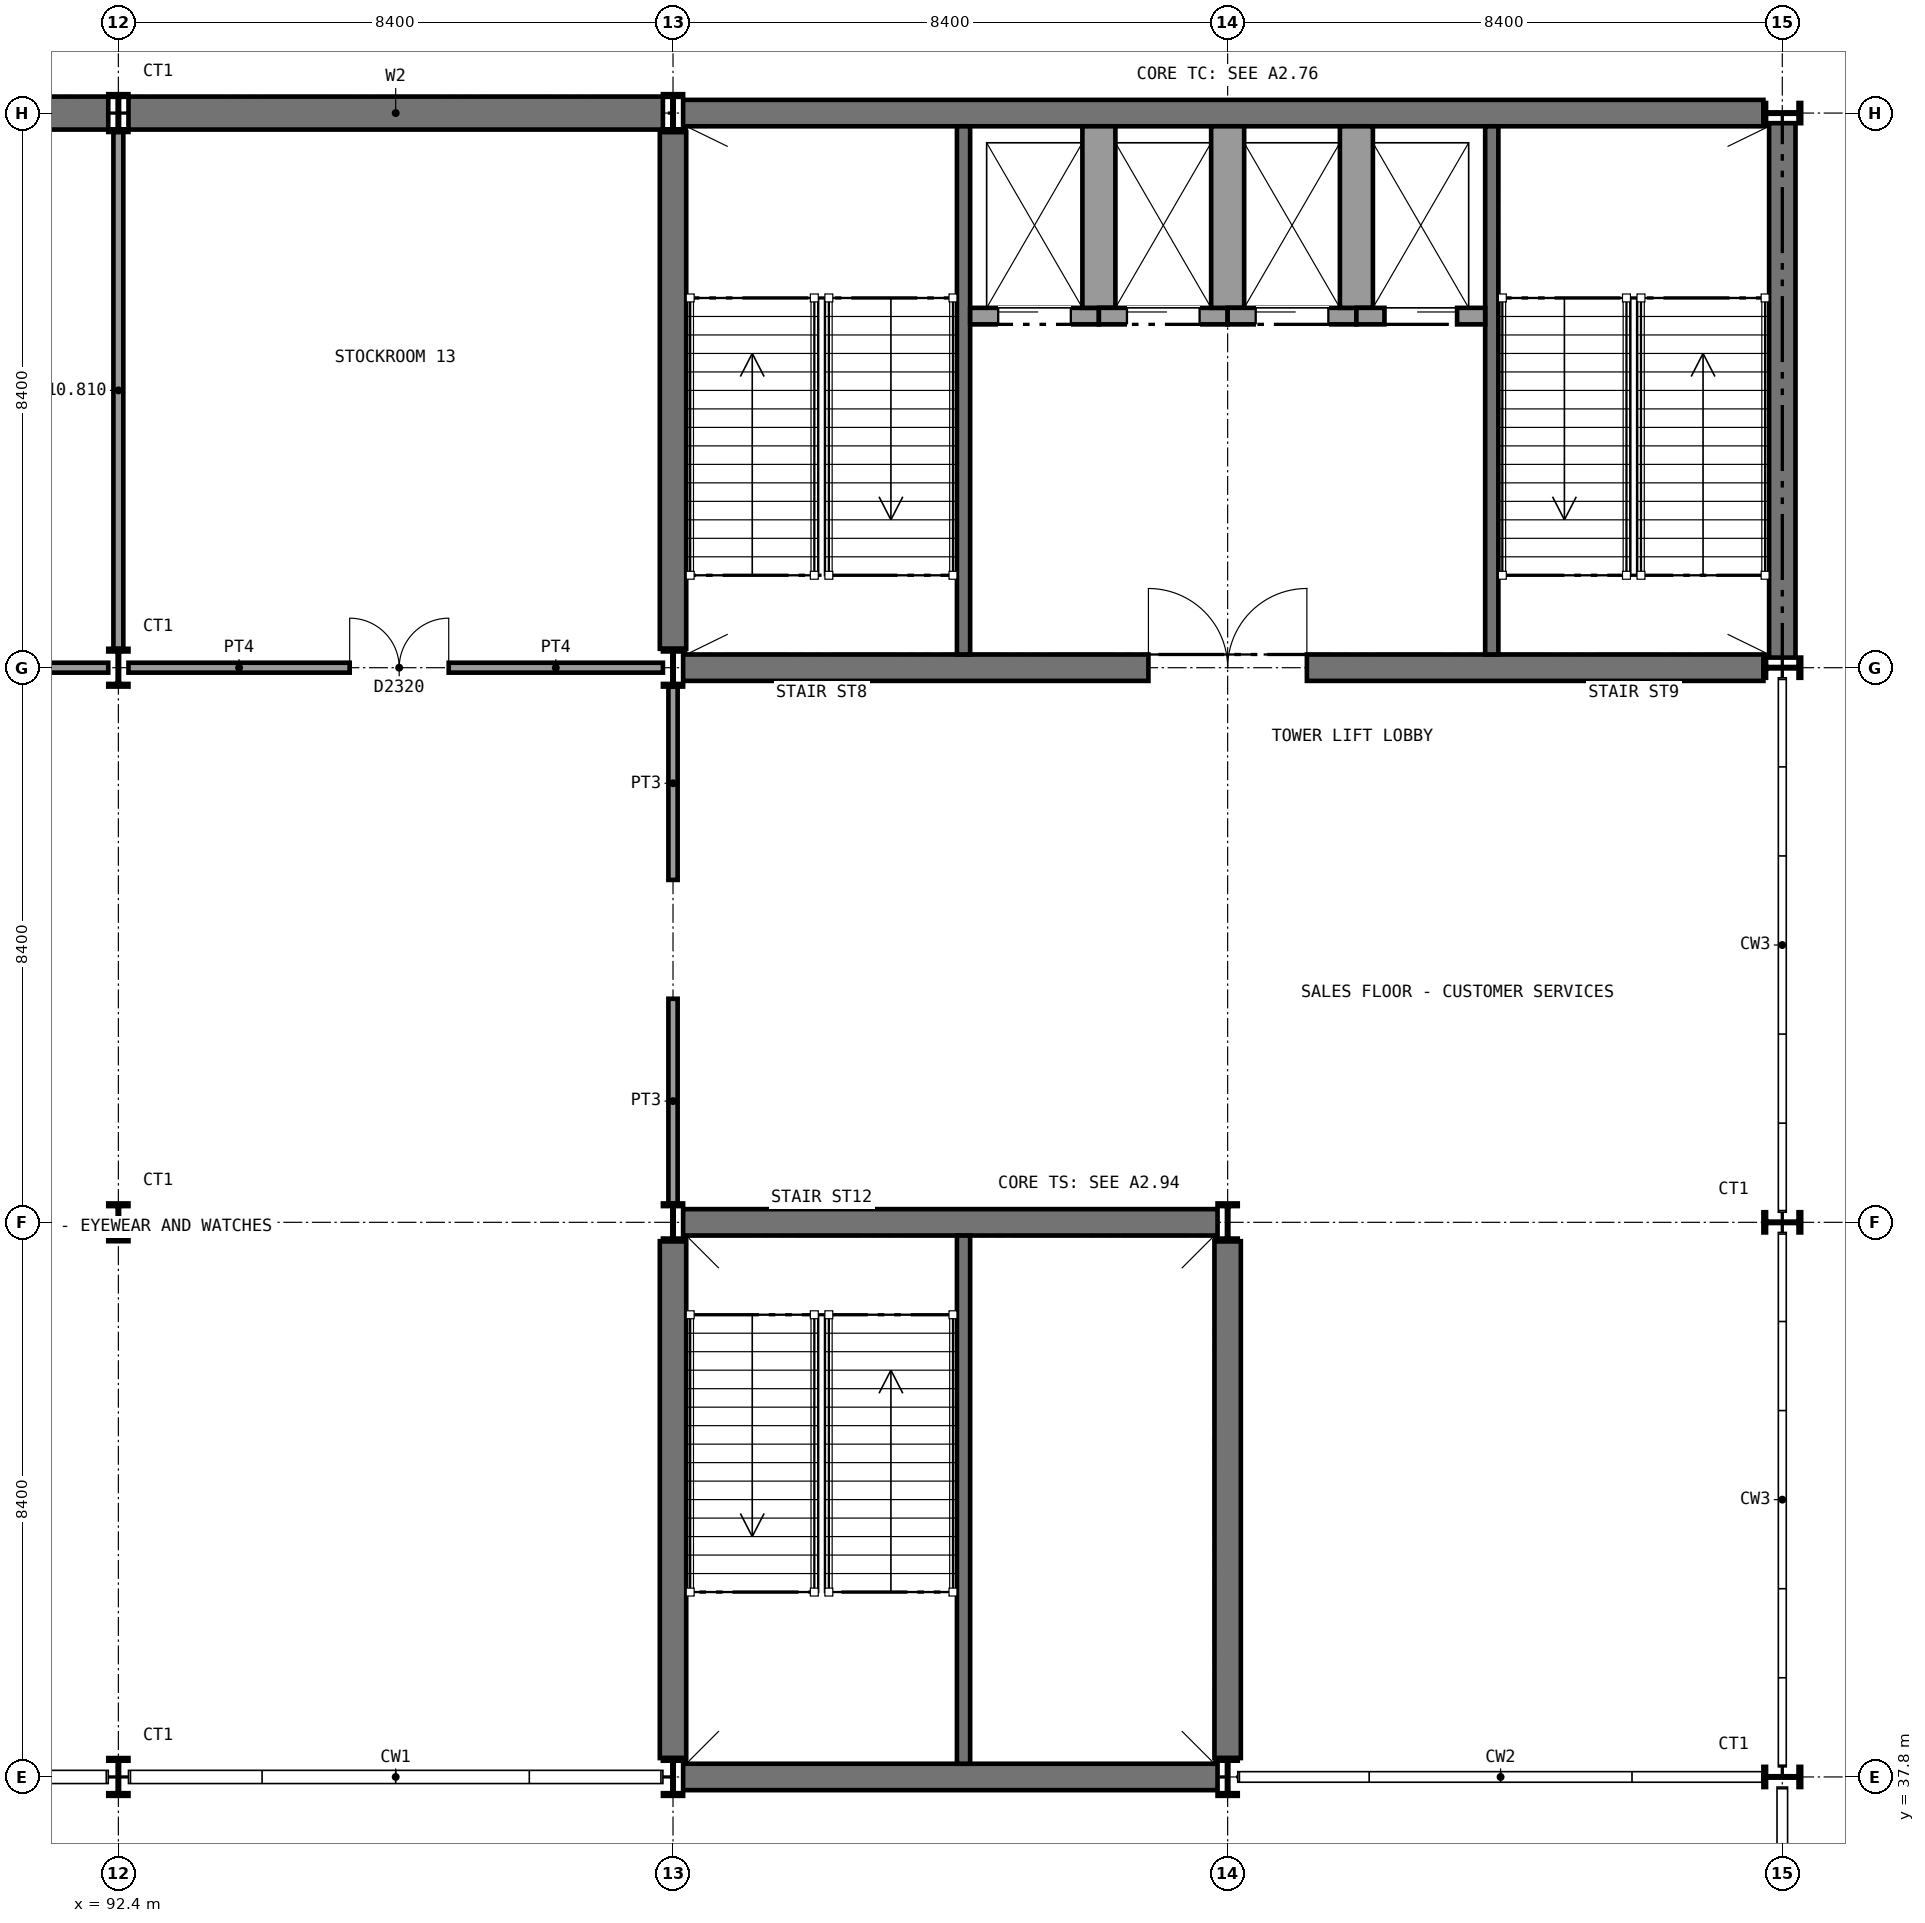
"""IFC4 building model, lengths in metres.
Left out: names, types, materials, properties, quantities, classifications, styles, units other than length and angle.
Written with IfcOpenShell. Run it as: python <this file> out.ifc"""

import sys

from ifc_helpers import new_model, si_unit, direction, frame, frame_2d, origin, origin_2d, place, context, subcontext, project, spatial, rectangle, i_section, extrude, element, fill, save


model = new_model("IFC4")
c1 = context("Model", 3, precision=1e-05, world=origin(), true_north=direction((0.0, 1.0)))
c2 = subcontext(c1, "Body", "Model", "MODEL_VIEW")
j1 = project(units=[si_unit("LENGTHUNIT", "METRE"), si_unit("PLANEANGLEUNIT", "RADIAN")], contexts=[c1])
p1 = place(None, origin())
s1 = spatial("IfcSite", under=j1, at=p1, CompositionType="ELEMENT")
p2 = place(p1, origin())
s2 = spatial("IfcBuilding", under=s1, at=p2, CompositionType="ELEMENT")
p3 = place(p2, frame((0.0, 0.0, 6.0)))
s3 = spatial("IfcBuildingStorey", under=s2, at=p3, CompositionType="ELEMENT", Elevation=6.0)
p4 = place(p3, frame((84.153, 63.0, 0.0), z_axis=(0.0, 0.0, 1.0), x_axis=(1.0, 0.0, 0.0)))
e1 = element("IfcWall", 1, at=p4, inside=s3, PredefinedType="SHEAR", context=c2, shape_type="SweptSolid", body=[
    extrude(rectangle(XDim=8.094, YDim=0.5, at=frame_2d((4.047, 0.0))), origin(), (0.0, 0.0, 1.0), 5.25),
])
p5 = place(p3, frame((92.553, 63.0, 0.0), z_axis=(0.0, 0.0, 1.0), x_axis=(1.0, 0.0, 0.0)))
e2 = element("IfcWall", 2, at=p5, inside=s3, PredefinedType="SHEAR", context=c2, shape_type="SweptSolid", body=[
    extrude(rectangle(XDim=8.094, YDim=0.5, at=frame_2d((4.047, 0.0))), origin(), (0.0, 0.0, 1.0), 5.25),
])
p6 = place(p3, frame((100.953, 63.0, 0.0), z_axis=(0.0, 0.0, 1.0), x_axis=(1.0, 0.0, 0.0)))
e3 = element("IfcWall", 3, at=p6, inside=s3, PredefinedType="SHEAR", context=c2, shape_type="SweptSolid", body=[
    extrude(rectangle(XDim=16.361, YDim=0.4, at=frame_2d((8.181, 0.0))), origin(), (0.0, 0.0, 1.0), 5.25),
])
p7 = place(p3, frame((100.953, 54.6, 0.0), z_axis=(0.0, 0.0, 1.0), x_axis=(1.0, 0.0, 0.0)))
e4 = element("IfcWall", 4, at=p7, inside=s3, PredefinedType="SHEAR", context=c2, shape_type="SweptSolid", body=[
    extrude(rectangle(XDim=16.361, YDim=0.4, at=frame_2d((8.181, 0.0))), origin(), (0.0, 0.0, 1.0), 5.25),
])
p8 = place(p7, frame((7.047, 0.0, 0.0)))
e5 = element("IfcOpeningElement", 5, at=p8, cuts=e4, PredefinedType="OPENING", context=c2, shape_type="SweptSolid", body=[
    extrude(rectangle(XDim=2.4, YDim=2.4, at=frame_2d((1.2, 1.2))), frame((0.0, 0.21, 0.0), z_axis=(0.0, -1.0, 0.0), x_axis=(1.0, 0.0, 0.0)), (0.0, 0.0, 1.0), 0.42),
])
p9 = place(p3, frame((100.8, 54.886, 0.0), z_axis=(0.0, 0.0, 1.0), x_axis=(0.0, 1.0, 0.0)))
e6 = element("IfcWall", 6, at=p9, inside=s3, PredefinedType="SHEAR", context=c2, shape_type="SweptSolid", body=[
    extrude(rectangle(XDim=7.828, YDim=0.4, at=frame_2d((3.914, 0.0))), origin(), (0.0, 0.0, 1.0), 5.25),
])
for number, where, z_axis, x_axis in (
    (7, (117.6, 54.753, 0.0), (0.0, 0.0, 1.0), (0.0, 1.0, 0.0)),
    (8, (100.953, 37.8, 0.0), (0.0, 0.0, 1.0), (1.0, 0.0, 0.0)),
    (9, (100.953, 46.2, 0.0), (0.0, 0.0, 1.0), (1.0, 0.0, 0.0)),
):
    element("IfcWall", number, at=place(p3, frame(where, z_axis=z_axis, x_axis=x_axis)), inside=s3, PredefinedType="SHEAR", context=c2, shape_type="SweptSolid", body=[
        extrude(rectangle(XDim=8.094, YDim=0.4, at=frame_2d((4.047, 0.0))), origin(), (0.0, 0.0, 1.0), 5.25),
    ])
for number, where, z_axis, x_axis in (
    (10, (100.8, 38.086, 0.0), (0.0, 0.0, 1.0), (0.0, 1.0, 0.0)),
    (11, (109.2, 38.086, 0.0), (0.0, 0.0, 1.0), (0.0, 1.0, 0.0)),
):
    element("IfcWall", number, at=place(p3, frame(where, z_axis=z_axis, x_axis=x_axis)), inside=s3, PredefinedType="SHEAR", context=c2, shape_type="SweptSolid", body=[
        extrude(rectangle(XDim=7.828, YDim=0.4, at=frame_2d((3.914, 0.0))), origin(), (0.0, 0.0, 1.0), 5.25),
    ])
for number, where, z_axis, x_axis in (
    (12, (92.4, 37.8, 0.0), (0.0, 0.0, 1.0), (1.0, 0.0, 0.0)),
    (13, (92.4, 46.2, 0.0), (0.0, 0.0, 1.0), (1.0, 0.0, 0.0)),
    (14, (92.4, 54.6, 0.0), (0.0, 0.0, 1.0), (1.0, 0.0, 0.0)),
    (15, (92.4, 63.0, 0.0), (0.0, 0.0, 1.0), (1.0, 0.0, 0.0)),
    (16, (100.8, 37.8, 0.0), (0.0, 0.0, 1.0), (1.0, 0.0, 0.0)),
    (17, (100.8, 46.2, 0.0), (0.0, 0.0, 1.0), (1.0, 0.0, 0.0)),
    (18, (100.8, 54.6, 0.0), (0.0, 0.0, 1.0), (1.0, 0.0, 0.0)),
    (19, (100.8, 63.0, 0.0), (0.0, 0.0, 1.0), (1.0, 0.0, 0.0)),
    (20, (109.2, 37.8, 0.0), (0.0, 0.0, 1.0), (1.0, 0.0, 0.0)),
    (21, (109.2, 46.2, 0.0), (0.0, 0.0, 1.0), (1.0, 0.0, 0.0)),
    (22, (117.6, 37.8, 0.0), (0.0, 0.0, 1.0), (0.0, 1.0, 0.0)),
    (23, (117.6, 46.2, 0.0), (0.0, 0.0, 1.0), (0.0, 1.0, 0.0)),
    (24, (117.6, 54.6, 0.0), (0.0, 0.0, 1.0), (0.0, 1.0, 0.0)),
    (25, (117.6, 63.0, 0.0), (0.0, 0.0, 1.0), (0.0, 1.0, 0.0)),
):
    element("IfcColumn", number, at=place(p3, frame(where, z_axis=z_axis, x_axis=x_axis)), inside=s3, PredefinedType="COLUMN", context=c2, shape_type="SweptSolid", body=[
        extrude(i_section(OverallWidth=0.306, OverallDepth=0.572, WebThickness=0.021, FlangeThickness=0.04, FilletRadius=0.027, at=origin_2d()), origin(), (0.0, 0.0, 1.0), 5.4),
    ])
p10 = place(p3, frame((92.4, 54.886, 0.0), z_axis=(0.0, 0.0, 1.0), x_axis=(0.0, 1.0, 0.0)))
e26 = element("IfcWall", 26, at=p10, inside=s3, PredefinedType="SOLIDWALL", context=c2, shape_type="SweptSolid", body=[
    extrude(rectangle(XDim=7.828, YDim=0.15, at=frame_2d((3.914, 0.0))), origin(), (0.0, 0.0, 1.0), 4.81),
])
p11 = place(p3, frame((84.153, 54.6, 0.0), z_axis=(0.0, 0.0, 1.0), x_axis=(1.0, 0.0, 0.0)))
e27 = element("IfcWall", 27, at=p11, inside=s3, PredefinedType="SOLIDWALL", context=c2, shape_type="SweptSolid", body=[
    extrude(rectangle(XDim=8.094, YDim=0.15, at=frame_2d((4.047, 0.0))), origin(), (0.0, 0.0, 1.0), 4.92),
])
p12 = place(p11, frame((3.35, 0.0, 0.0)))
e28 = element("IfcOpeningElement", 28, at=p12, cuts=e27, PredefinedType="OPENING", context=c2, shape_type="SweptSolid", body=[
    extrude(rectangle(XDim=1.5, YDim=2.1, at=frame_2d((0.75, 1.05))), frame((0.0, 0.085, 0.0), z_axis=(0.0, -1.0, 0.0), x_axis=(1.0, 0.0, 0.0)), (0.0, 0.0, 1.0), 0.17),
])
p13 = place(p3, frame((92.553, 54.6, 0.0), z_axis=(0.0, 0.0, 1.0), x_axis=(1.0, 0.0, 0.0)))
e29 = element("IfcWall", 29, at=p13, inside=s3, PredefinedType="SOLIDWALL", context=c2, shape_type="SweptSolid", body=[
    extrude(rectangle(XDim=8.094, YDim=0.15, at=frame_2d((4.047, 0.0))), origin(), (0.0, 0.0, 1.0), 4.92),
])
p14 = place(p13, frame((3.35, 0.0, 0.0)))
e30 = element("IfcOpeningElement", 30, at=p14, cuts=e29, PredefinedType="OPENING", context=c2, shape_type="SweptSolid", body=[
    extrude(rectangle(XDim=1.5, YDim=2.1, at=frame_2d((0.75, 1.05))), frame((0.0, 0.085, 0.0), z_axis=(0.0, -1.0, 0.0), x_axis=(1.0, 0.0, 0.0)), (0.0, 0.0, 1.0), 0.17),
])
p15 = place(p3, frame((100.8, 46.486, 0.0), z_axis=(0.0, 0.0, 1.0), x_axis=(0.0, 1.0, 0.0)))
e31 = element("IfcWall", 31, at=p15, inside=s3, PredefinedType="PARTITIONING", context=c2, shape_type="SweptSolid", body=[
    extrude(rectangle(XDim=3.1, YDim=0.14, at=frame_2d((1.55, 0.0))), origin(), (0.0, 0.0, 1.0), 4.81),
])
p16 = place(p3, frame((100.8, 51.386, 0.0), z_axis=(0.0, 0.0, 1.0), x_axis=(0.0, 1.0, 0.0)))
e32 = element("IfcWall", 32, at=p16, inside=s3, PredefinedType="PARTITIONING", context=c2, shape_type="SweptSolid", body=[
    extrude(rectangle(XDim=2.928, YDim=0.14, at=frame_2d((1.464, 0.0))), origin(), (0.0, 0.0, 1.0), 4.81),
])
for number, where, z_axis, x_axis in (
    (33, (105.2, 62.8, 0.0), (0.0, 0.0, 1.0), (0.0, -1.0, 0.0)),
    (34, (113.2, 62.8, 0.0), (0.0, 0.0, 1.0), (0.0, -1.0, 0.0)),
):
    element("IfcWall", number, at=place(p3, frame(where, z_axis=z_axis, x_axis=x_axis)), inside=s3, PredefinedType="SHEAR", context=c2, shape_type="SweptSolid", body=[
        extrude(rectangle(XDim=8.0, YDim=0.2, at=frame_2d((4.0, 0.0))), origin(), (0.0, 0.0, 1.0), 5.25),
    ])
p17 = place(p3, frame((105.3, 59.925, 0.0), z_axis=(0.0, 0.0, 1.0), x_axis=(1.0, 0.0, 0.0)))
e35 = element("IfcWall", 35, at=p17, inside=s3, PredefinedType="SOLIDWALL", context=c2, shape_type="SweptSolid", body=[
    extrude(rectangle(XDim=1.95, YDim=0.25, at=frame_2d((0.975, 0.0))), origin(), (0.0, 0.0, 1.0), 5.4),
])
p18 = place(p17, frame((0.425, 0.0, 0.0)))
e36 = element("IfcOpeningElement", 36, at=p18, cuts=e35, PredefinedType="OPENING", context=c2, shape_type="SweptSolid", body=[
    extrude(rectangle(XDim=1.1, YDim=2.1, at=frame_2d((0.55, 1.05))), frame((0.0, 0.135, 0.0), z_axis=(0.0, -1.0, 0.0), x_axis=(1.0, 0.0, 0.0)), (0.0, 0.0, 1.0), 0.27),
])
p19 = place(p3, frame((107.25, 62.8, 0.0), z_axis=(0.0, 0.0, 1.0), x_axis=(0.0, -1.0, 0.0)))
e37 = element("IfcWall", 37, at=p19, inside=s3, PredefinedType="SOLIDWALL", context=c2, shape_type="SweptSolid", body=[
    extrude(rectangle(XDim=2.75, YDim=0.5, at=frame_2d((1.375, 0.0))), origin(), (0.0, 0.0, 1.0), 5.4),
])
p20 = place(p3, frame((107.25, 59.925, 0.0), z_axis=(0.0, 0.0, 1.0), x_axis=(1.0, 0.0, 0.0)))
e38 = element("IfcWall", 38, at=p20, inside=s3, PredefinedType="SOLIDWALL", context=c2, shape_type="SweptSolid", body=[
    extrude(rectangle(XDim=1.95, YDim=0.25, at=frame_2d((0.975, 0.0))), origin(), (0.0, 0.0, 1.0), 5.4),
])
p21 = place(p20, frame((0.425, 0.0, 0.0)))
e39 = element("IfcOpeningElement", 39, at=p21, cuts=e38, PredefinedType="OPENING", context=c2, shape_type="SweptSolid", body=[
    extrude(rectangle(XDim=1.1, YDim=2.1, at=frame_2d((0.55, 1.05))), frame((0.0, 0.135, 0.0), z_axis=(0.0, -1.0, 0.0), x_axis=(1.0, 0.0, 0.0)), (0.0, 0.0, 1.0), 0.27),
])
p22 = place(p3, frame((109.2, 62.8, 0.0), z_axis=(0.0, 0.0, 1.0), x_axis=(0.0, -1.0, 0.0)))
e40 = element("IfcWall", 40, at=p22, inside=s3, PredefinedType="SOLIDWALL", context=c2, shape_type="SweptSolid", body=[
    extrude(rectangle(XDim=2.75, YDim=0.5, at=frame_2d((1.375, 0.0))), origin(), (0.0, 0.0, 1.0), 5.4),
])
p23 = place(p3, frame((109.2, 59.925, 0.0), z_axis=(0.0, 0.0, 1.0), x_axis=(1.0, 0.0, 0.0)))
e41 = element("IfcWall", 41, at=p23, inside=s3, PredefinedType="SOLIDWALL", context=c2, shape_type="SweptSolid", body=[
    extrude(rectangle(XDim=1.95, YDim=0.25, at=frame_2d((0.975, 0.0))), origin(), (0.0, 0.0, 1.0), 5.4),
])
p24 = place(p23, frame((0.425, 0.0, 0.0)))
e42 = element("IfcOpeningElement", 42, at=p24, cuts=e41, PredefinedType="OPENING", context=c2, shape_type="SweptSolid", body=[
    extrude(rectangle(XDim=1.1, YDim=2.1, at=frame_2d((0.55, 1.05))), frame((0.0, 0.135, 0.0), z_axis=(0.0, -1.0, 0.0), x_axis=(1.0, 0.0, 0.0)), (0.0, 0.0, 1.0), 0.27),
])
p25 = place(p3, frame((111.15, 62.8, 0.0), z_axis=(0.0, 0.0, 1.0), x_axis=(0.0, -1.0, 0.0)))
e43 = element("IfcWall", 43, at=p25, inside=s3, PredefinedType="SOLIDWALL", context=c2, shape_type="SweptSolid", body=[
    extrude(rectangle(XDim=2.75, YDim=0.5, at=frame_2d((1.375, 0.0))), origin(), (0.0, 0.0, 1.0), 5.4),
])
p26 = place(p3, frame((111.15, 59.925, 0.0), z_axis=(0.0, 0.0, 1.0), x_axis=(1.0, 0.0, 0.0)))
e44 = element("IfcWall", 44, at=p26, inside=s3, PredefinedType="SOLIDWALL", context=c2, shape_type="SweptSolid", body=[
    extrude(rectangle(XDim=1.95, YDim=0.25, at=frame_2d((0.975, 0.0))), origin(), (0.0, 0.0, 1.0), 5.4),
])
p27 = place(p26, frame((0.425, 0.0, 0.0)))
e45 = element("IfcOpeningElement", 45, at=p27, cuts=e44, PredefinedType="OPENING", context=c2, shape_type="SweptSolid", body=[
    extrude(rectangle(XDim=1.1, YDim=2.1, at=frame_2d((0.55, 1.05))), frame((0.0, 0.135, 0.0), z_axis=(0.0, -1.0, 0.0), x_axis=(1.0, 0.0, 0.0)), (0.0, 0.0, 1.0), 0.27),
])
p28 = place(p3, frame((105.2, 38.0, 0.0), z_axis=(0.0, 0.0, 1.0), x_axis=(0.0, 1.0, 0.0)))
e46 = element("IfcWall", 46, at=p28, inside=s3, PredefinedType="SHEAR", context=c2, shape_type="SweptSolid", body=[
    extrude(rectangle(XDim=8.0, YDim=0.2, at=frame_2d((4.0, 0.0))), origin(), (0.0, 0.0, 1.0), 5.25),
])
p29 = place(p14, origin())
e47 = element("IfcDoor", 47, at=p29, inside=s3, OperationType="DOUBLE_DOOR_SINGLE_SWING", PredefinedType="DOOR", context=c2, shape_type="SweptSolid", body=[
    extrude(rectangle(XDim=1.5, YDim=2.1, at=frame_2d((0.75, 1.05))), frame((0.0, 0.025, 0.0), z_axis=(0.0, -1.0, 0.0), x_axis=(1.0, 0.0, 0.0)), (0.0, 0.0, 1.0), 0.05),
])
fill(e30, e47)
p30 = place(p18, frame((1.1, 0.0, 0.0), z_axis=(0.0, 0.0, 1.0), x_axis=(-1.0, 0.0, 0.0)))
e48 = element("IfcDoor", 48, at=p30, inside=s3, OperationType="SLIDING_TO_RIGHT", PredefinedType="DOOR", context=c2, shape_type="SweptSolid", body=[
    extrude(rectangle(XDim=1.1, YDim=2.1, at=frame_2d((0.55, 1.05))), frame((0.0, 0.025, 0.0), z_axis=(0.0, -1.0, 0.0), x_axis=(1.0, 0.0, 0.0)), (0.0, 0.0, 1.0), 0.05),
])
fill(e36, e48)
p31 = place(p21, frame((1.1, 0.0, 0.0), z_axis=(0.0, 0.0, 1.0), x_axis=(-1.0, 0.0, 0.0)))
e49 = element("IfcDoor", 49, at=p31, inside=s3, OperationType="SLIDING_TO_RIGHT", PredefinedType="DOOR", context=c2, shape_type="SweptSolid", body=[
    extrude(rectangle(XDim=1.1, YDim=2.1, at=frame_2d((0.55, 1.05))), frame((0.0, 0.025, 0.0), z_axis=(0.0, -1.0, 0.0), x_axis=(1.0, 0.0, 0.0)), (0.0, 0.0, 1.0), 0.05),
])
fill(e39, e49)
p32 = place(p24, frame((1.1, 0.0, 0.0), z_axis=(0.0, 0.0, 1.0), x_axis=(-1.0, 0.0, 0.0)))
e50 = element("IfcDoor", 50, at=p32, inside=s3, OperationType="SLIDING_TO_RIGHT", PredefinedType="DOOR", context=c2, shape_type="SweptSolid", body=[
    extrude(rectangle(XDim=1.1, YDim=2.1, at=frame_2d((0.55, 1.05))), frame((0.0, 0.025, 0.0), z_axis=(0.0, -1.0, 0.0), x_axis=(1.0, 0.0, 0.0)), (0.0, 0.0, 1.0), 0.05),
])
fill(e42, e50)
p33 = place(p27, frame((1.1, 0.0, 0.0), z_axis=(0.0, 0.0, 1.0), x_axis=(-1.0, 0.0, 0.0)))
e51 = element("IfcDoor", 51, at=p33, inside=s3, OperationType="SLIDING_TO_LEFT", PredefinedType="DOOR", context=c2, shape_type="SweptSolid", body=[
    extrude(rectangle(XDim=1.1, YDim=2.1, at=frame_2d((0.55, 1.05))), frame((0.0, 0.025, 0.0), z_axis=(0.0, -1.0, 0.0), x_axis=(1.0, 0.0, 0.0)), (0.0, 0.0, 1.0), 0.05),
])
fill(e45, e51)
p34 = place(p8, origin())
e52 = element("IfcDoor", 52, at=p34, inside=s3, OperationType="DOUBLE_DOOR_SINGLE_SWING", PredefinedType="DOOR", context=c2, shape_type="SweptSolid", body=[
    extrude(rectangle(XDim=2.4, YDim=2.4, at=frame_2d((1.2, 1.2))), frame((0.0, 0.025, 0.0), z_axis=(0.0, -1.0, 0.0), x_axis=(1.0, 0.0, 0.0)), (0.0, 0.0, 1.0), 0.05),
])
fill(e5, e52)
save(model, sys.argv[1])
